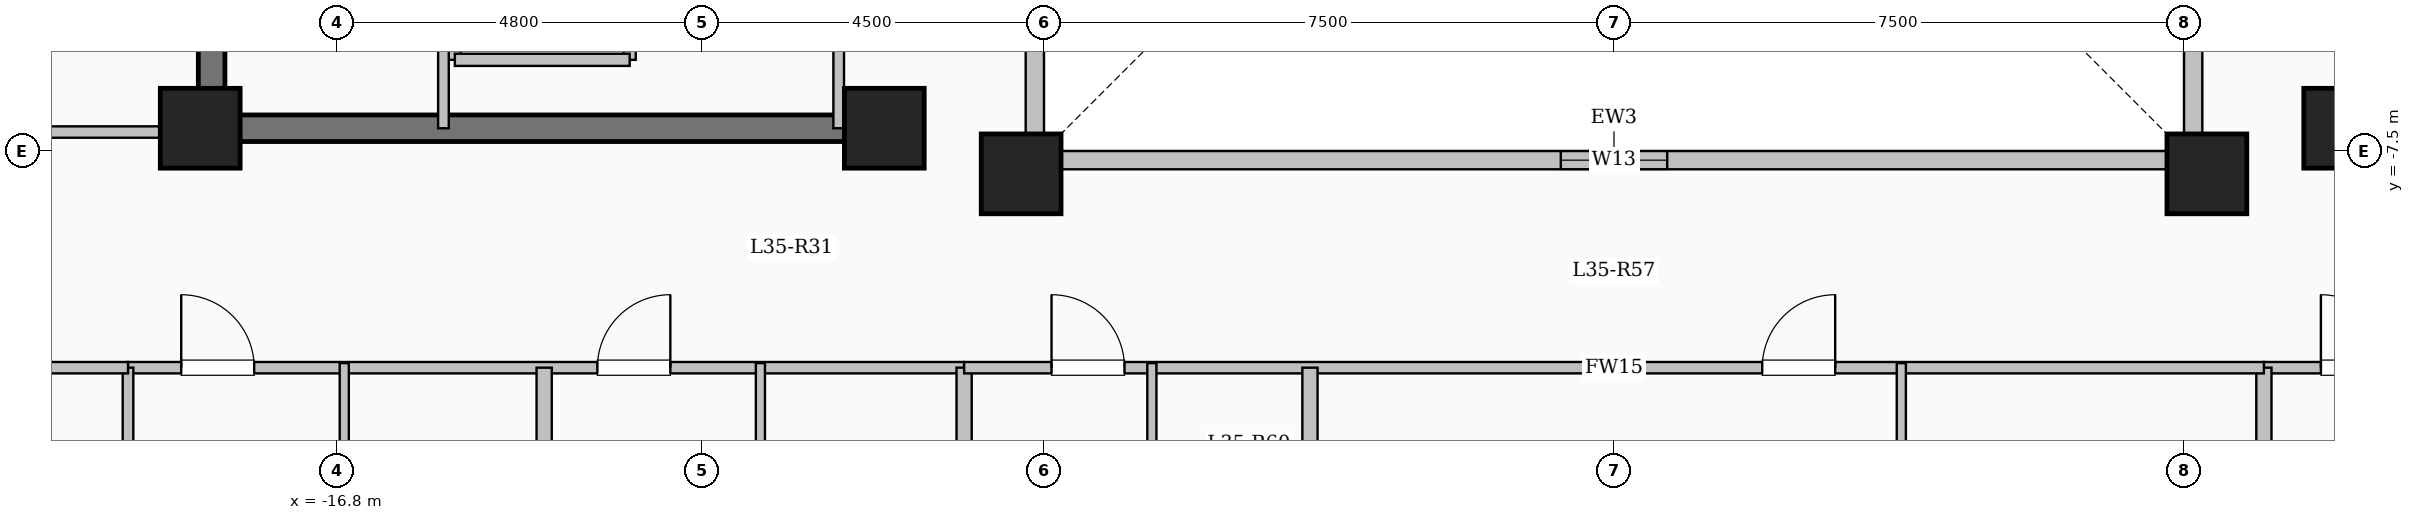
"""IFC4 building model, lengths in metres.
Left out: names, types, materials, properties, quantities, classifications, styles, units other than length and angle.
Written with IfcOpenShell. Run it as: python <this file> out.ifc"""

import sys

from ifc_helpers import new_model, si_unit, direction, frame, frame_2d, origin, origin_2d, place, context, subcontext, project, spatial, rectangle, extrude, element, fill, save


model = new_model("IFC4")
c1 = context("Model", 3, precision=1e-05, world=origin(), true_north=direction((0.0, 1.0)))
c2 = subcontext(c1, "Body", "Model", "MODEL_VIEW")
j1 = project(units=[si_unit("LENGTHUNIT", "METRE"), si_unit("PLANEANGLEUNIT", "RADIAN")], contexts=[c1])
p1 = place(None, origin())
s1 = spatial("IfcSite", under=j1, at=p1, CompositionType="ELEMENT")
p2 = place(p1, origin())
s2 = spatial("IfcBuilding", under=s1, at=p2, CompositionType="ELEMENT")
p3 = place(p2, frame((0.0, 0.0, 132.6)))
s3 = spatial("IfcBuildingStorey", under=s2, at=p3, CompositionType="ELEMENT", Elevation=132.6)
for number, where, z_axis, x_axis in (
    (1, (-7.8, -7.8, 0.0), (0.0, 0.0, 1.0), (1.0, 0.0, 0.0)),
    (2, (7.8, -7.8, 0.0), (0.0, 0.0, 1.0), (1.0, 0.0, 0.0)),
    (3, (-9.6, -7.2, 0.0), (0.0, 0.0, 1.0), (1.0, 0.0, 0.0)),
    (4, (9.6, -7.2, 0.0), (0.0, 0.0, 1.0), (1.0, 0.0, 0.0)),
    (5, (-18.6, -7.2, 0.0), (0.0, 0.0, 1.0), (1.0, 0.0, 0.0)),
):
    element("IfcColumn", number, at=place(p3, frame(where, z_axis=z_axis, x_axis=x_axis)), inside=s3, PredefinedType="COLUMN", context=c2, shape_type="SweptSolid", body=[
        extrude(rectangle(XDim=1.05, YDim=1.05, at=origin_2d()), origin(), (0.0, 0.0, 1.0), 3.35),
    ])
p4 = place(p3, frame((-7.62, -7.62, 0.0), z_axis=(0.0, 0.0, 1.0), x_axis=(1.0, 0.0, 0.0)))
e6 = element("IfcWall", 6, at=p4, inside=s3, PredefinedType="SOLIDWALL", context=c2, shape_type="SweptSolid", body=[
    extrude(rectangle(XDim=15.24, YDim=0.24, at=frame_2d((7.62, 0.0))), origin(), (0.0, 0.0, 1.0), 3.1),
])
p5 = place(p4, frame((6.92, 0.0, 0.95)))
e7 = element("IfcOpeningElement", 7, at=p5, cuts=e6, PredefinedType="OPENING", context=c2, shape_type="SweptSolid", body=[
    extrude(rectangle(XDim=1.4, YDim=1.5, at=frame_2d((0.7, 0.75))), frame((0.0, 0.13, 0.0), z_axis=(0.0, -1.0, 0.0), x_axis=(1.0, 0.0, 0.0)), (0.0, 0.0, 1.0), 0.26),
])
p6 = place(p3, frame((7.62, -7.62, 0.0), z_axis=(0.0, 0.0, 1.0), x_axis=(0.0, 1.0, 0.0)))
e8 = element("IfcWall", 8, at=p6, inside=s3, PredefinedType="SOLIDWALL", context=c2, shape_type="SweptSolid", body=[
    extrude(rectangle(XDim=15.24, YDim=0.24, at=frame_2d((7.62, 0.0))), origin(), (0.0, 0.0, 1.0), 3.1),
])
p7 = place(p6, frame((6.92, 0.0, 0.95)))
e9 = element("IfcOpeningElement", 9, at=p7, cuts=e8, PredefinedType="OPENING", context=c2, shape_type="SweptSolid", body=[
    extrude(rectangle(XDim=1.4, YDim=1.5, at=frame_2d((0.7, 0.75))), frame((0.0, 0.13, 0.0), z_axis=(0.0, -1.0, 0.0), x_axis=(1.0, 0.0, 0.0)), (0.0, 0.0, 1.0), 0.26),
])
p8 = place(p3, frame((-7.62, 7.62, 0.0), z_axis=(0.0, 0.0, 1.0), x_axis=(0.0, -1.0, 0.0)))
e10 = element("IfcWall", 10, at=p8, inside=s3, PredefinedType="SOLIDWALL", context=c2, shape_type="SweptSolid", body=[
    extrude(rectangle(XDim=15.24, YDim=0.24, at=frame_2d((7.62, 0.0))), origin(), (0.0, 0.0, 1.0), 3.1),
])
p9 = place(p8, frame((6.92, 0.0, 0.95)))
e11 = element("IfcOpeningElement", 11, at=p9, cuts=e10, PredefinedType="OPENING", context=c2, shape_type="SweptSolid", body=[
    extrude(rectangle(XDim=1.4, YDim=1.5, at=frame_2d((0.7, 0.75))), frame((0.0, 0.13, 0.0), z_axis=(0.0, -1.0, 0.0), x_axis=(1.0, 0.0, 0.0)), (0.0, 0.0, 1.0), 0.26),
])
for number, where, z_axis, x_axis in (
    (12, (-15.25, -6.3, 0.0), (0.0, 0.0, 1.0), (0.0, 1.0, 0.0)),
    (13, (-12.95, -6.3, 0.0), (0.0, 0.0, 1.0), (0.0, 1.0, 0.0)),
):
    element("IfcWall", number, at=place(p3, frame(where, z_axis=z_axis, x_axis=x_axis)), inside=s3, PredefinedType="SOLIDWALL", context=c2, shape_type="SweptSolid", body=[
        extrude(rectangle(XDim=2.6, YDim=0.16, at=frame_2d((1.3, 0.0))), origin(), (0.0, 0.0, 1.0), 3.1),
    ])
p10 = place(p3, frame((-15.25, -6.3, 0.0), z_axis=(0.0, 0.0, 1.0), x_axis=(1.0, 0.0, 0.0)))
e14 = element("IfcWall", 14, at=p10, inside=s3, PredefinedType="SOLIDWALL", context=c2, shape_type="SweptSolid", body=[
    extrude(rectangle(XDim=2.3, YDim=0.16, at=frame_2d((1.15, 0.0))), origin(), (0.0, 0.0, 1.0), 3.1),
])
p11 = place(p3, frame((-18.45, -7.375, 0.0), z_axis=(0.0, 0.0, 1.0), x_axis=(0.0, 1.0, 0.0)))
e15 = element("IfcWall", 15, at=p11, inside=s3, PredefinedType="SHEAR", context=c2, shape_type="SweptSolid", body=[
    extrude(rectangle(XDim=14.05, YDim=0.35, at=frame_2d((7.025, 0.0))), origin(), (0.0, 0.0, 1.0), 3.35),
])
p12 = place(p3, frame((-18.625, -7.2, 0.0), z_axis=(0.0, 0.0, 1.0), x_axis=(1.0, 0.0, 0.0)))
e16 = element("IfcWall", 16, at=p12, inside=s3, PredefinedType="SHEAR", context=c2, shape_type="SweptSolid", body=[
    extrude(rectangle(XDim=8.55, YDim=0.35, at=frame_2d((4.275, 0.0))), origin(), (0.0, 0.0, 1.0), 3.35),
])
p13 = place(p3, frame((-15.4, -7.2, 0.0), z_axis=(0.0, 0.0, 1.0), x_axis=(0.0, 1.0, 0.0)))
e17 = element("IfcWall", 17, at=p13, inside=s3, PredefinedType="PARTITIONING", context=c2, shape_type="SweptSolid", body=[
    extrude(rectangle(XDim=10.45, YDim=0.14, at=frame_2d((5.225, 0.0))), origin(), (0.0, 0.0, 1.0), 3.1),
])
p14 = place(p13, frame((9.25, 0.0, 0.0)))
e18 = element("IfcOpeningElement", 18, at=p14, cuts=e17, PredefinedType="OPENING", context=c2, shape_type="SweptSolid", body=[
    extrude(rectangle(XDim=0.9, YDim=2.08, at=frame_2d((0.45, 1.04))), frame((0.0, 0.08, 0.0), z_axis=(0.0, -1.0, 0.0), x_axis=(1.0, 0.0, 0.0)), (0.0, 0.0, 1.0), 0.16),
])
p15 = place(p3, frame((-10.2, -7.2, 0.0), z_axis=(0.0, 0.0, 1.0), x_axis=(0.0, 1.0, 0.0)))
e19 = element("IfcWall", 19, at=p15, inside=s3, PredefinedType="PARTITIONING", context=c2, shape_type="SweptSolid", body=[
    extrude(rectangle(XDim=9.12, YDim=0.14, at=frame_2d((4.56, 0.0))), origin(), (0.0, 0.0, 1.0), 3.1),
])
p16 = place(p15, frame((1.9, 0.0, 0.0)))
e20 = element("IfcOpeningElement", 20, at=p16, cuts=e19, PredefinedType="OPENING", context=c2, shape_type="SweptSolid", body=[
    extrude(rectangle(XDim=0.95, YDim=2.12, at=frame_2d((0.475, 1.06))), frame((0.0, 0.08, 0.0), z_axis=(0.0, -1.0, 0.0), x_axis=(1.0, 0.0, 0.0)), (0.0, 0.0, 1.0), 0.16),
])
p17 = place(p15, frame((6.6, 0.0, 0.0)))
e21 = element("IfcOpeningElement", 21, at=p17, cuts=e19, PredefinedType="OPENING", context=c2, shape_type="SweptSolid", body=[
    extrude(rectangle(XDim=0.95, YDim=2.12, at=frame_2d((0.475, 1.06))), frame((0.0, 0.08, 0.0), z_axis=(0.0, -1.0, 0.0), x_axis=(1.0, 0.0, 0.0)), (0.0, 0.0, 1.0), 0.16),
])
p18 = place(p3, frame((-19.55, -10.35, 0.0), z_axis=(0.0, 0.0, 1.0), x_axis=(1.0, 0.0, 0.0)))
e22 = element("IfcWall", 22, at=p18, inside=s3, PredefinedType="PARTITIONING", context=c2, shape_type="SweptSolid", body=[
    extrude(rectangle(XDim=11.0, YDim=0.15, at=frame_2d((5.5, 0.0))), origin(), (0.0, 0.0, 1.0), 3.1),
])
p19 = place(p18, frame((0.7, 0.0, 0.0)))
e23 = element("IfcOpeningElement", 23, at=p19, cuts=e22, PredefinedType="OPENING", context=c2, shape_type="SweptSolid", body=[
    extrude(rectangle(XDim=0.96, YDim=2.15, at=frame_2d((0.48, 1.075))), frame((0.0, 0.085, 0.0), z_axis=(0.0, -1.0, 0.0), x_axis=(1.0, 0.0, 0.0)), (0.0, 0.0, 1.0), 0.17),
])
p20 = place(p18, frame((6.175, 0.0, 0.0)))
e24 = element("IfcOpeningElement", 24, at=p20, cuts=e22, PredefinedType="OPENING", context=c2, shape_type="SweptSolid", body=[
    extrude(rectangle(XDim=0.96, YDim=2.15, at=frame_2d((0.48, 1.075))), frame((0.0, 0.085, 0.0), z_axis=(0.0, -1.0, 0.0), x_axis=(1.0, 0.0, 0.0)), (0.0, 0.0, 1.0), 0.17),
])
p21 = place(p3, frame((8.55, -10.35, 0.0), z_axis=(0.0, 0.0, 1.0), x_axis=(1.0, 0.0, 0.0)))
e25 = element("IfcWall", 25, at=p21, inside=s3, PredefinedType="PARTITIONING", context=c2, shape_type="SweptSolid", body=[
    extrude(rectangle(XDim=11.0, YDim=0.15, at=frame_2d((5.5, 0.0))), origin(), (0.0, 0.0, 1.0), 3.1),
])
p22 = place(p21, frame((0.75, 0.0, 0.0)))
e26 = element("IfcOpeningElement", 26, at=p22, cuts=e25, PredefinedType="OPENING", context=c2, shape_type="SweptSolid", body=[
    extrude(rectangle(XDim=0.96, YDim=2.15, at=frame_2d((0.48, 1.075))), frame((0.0, 0.085, 0.0), z_axis=(0.0, -1.0, 0.0), x_axis=(1.0, 0.0, 0.0)), (0.0, 0.0, 1.0), 0.17),
])
p23 = place(p21, frame((5.787, 0.0, 0.0)))
e27 = element("IfcOpeningElement", 27, at=p23, cuts=e25, PredefinedType="OPENING", context=c2, shape_type="SweptSolid", body=[
    extrude(rectangle(XDim=0.96, YDim=2.15, at=frame_2d((0.48, 1.075))), frame((0.0, 0.085, 0.0), z_axis=(0.0, -1.0, 0.0), x_axis=(1.0, 0.0, 0.0)), (0.0, 0.0, 1.0), 0.17),
])
p24 = place(p3, frame((-14.075, -21.2, 0.0), z_axis=(0.0, 0.0, 1.0), x_axis=(0.0, 1.0, 0.0)))
e28 = element("IfcWall", 28, at=p24, inside=s3, PredefinedType="SOLIDWALL", context=c2, shape_type="SweptSolid", body=[
    extrude(rectangle(XDim=10.85, YDim=0.2, at=frame_2d((5.425, 0.0))), origin(), (0.0, 0.0, 1.0), 3.1),
])
p25 = place(p3, frame((-16.705, -13.51, 0.0), z_axis=(0.0, 0.0, 1.0), x_axis=(0.0, 1.0, 0.0)))
e29 = element("IfcWall", 29, at=p25, inside=s3, PredefinedType="PARTITIONING", context=c2, shape_type="SweptSolid", body=[
    extrude(rectangle(XDim=3.22, YDim=0.12, at=frame_2d((1.61, 0.0))), origin(), (0.0, 0.0, 1.0), 3.1),
])
p26 = place(p25, frame((1.14, 0.0, 0.0)))
e30 = element("IfcOpeningElement", 30, at=p26, cuts=e29, PredefinedType="OPENING", context=c2, shape_type="SweptSolid", body=[
    extrude(rectangle(XDim=0.88, YDim=2.1, at=frame_2d((0.44, 1.05))), frame((0.0, 0.07, 0.0), z_axis=(0.0, -1.0, 0.0), x_axis=(1.0, 0.0, 0.0)), (0.0, 0.0, 1.0), 0.14),
])
p27 = place(p3, frame((-11.23, -13.51, 0.0), z_axis=(0.0, 0.0, 1.0), x_axis=(0.0, 1.0, 0.0)))
e31 = element("IfcWall", 31, at=p27, inside=s3, PredefinedType="PARTITIONING", context=c2, shape_type="SweptSolid", body=[
    extrude(rectangle(XDim=3.22, YDim=0.12, at=frame_2d((1.61, 0.0))), origin(), (0.0, 0.0, 1.0), 3.1),
])
p28 = place(p27, frame((1.14, 0.0, 0.0)))
e32 = element("IfcOpeningElement", 32, at=p28, cuts=e31, PredefinedType="OPENING", context=c2, shape_type="SweptSolid", body=[
    extrude(rectangle(XDim=0.88, YDim=2.1, at=frame_2d((0.44, 1.05))), frame((0.0, 0.07, 0.0), z_axis=(0.0, -1.0, 0.0), x_axis=(1.0, 0.0, 0.0)), (0.0, 0.0, 1.0), 0.14),
])
for number, where, z_axis, x_axis in (
    (33, (-8.55, -21.804, 0.0), (0.0, 0.0, 1.0), (0.0, 1.0, 0.0)),
    (34, (8.55, -21.804, 0.0), (0.0, 0.0, 1.0), (0.0, 1.0, 0.0)),
):
    element("IfcWall", number, at=place(p3, frame(where, z_axis=z_axis, x_axis=x_axis)), inside=s3, PredefinedType="SOLIDWALL", context=c2, shape_type="SweptSolid", body=[
        extrude(rectangle(XDim=11.454, YDim=0.2, at=frame_2d((5.727, 0.0))), origin(), (0.0, 0.0, 1.0), 3.1),
    ])
p29 = place(p3, frame((-8.55, -10.35, 0.0), z_axis=(0.0, 0.0, 1.0), x_axis=(1.0, 0.0, 0.0)))
e35 = element("IfcWall", 35, at=p29, inside=s3, PredefinedType="PARTITIONING", context=c2, shape_type="SweptSolid", body=[
    extrude(rectangle(XDim=17.1, YDim=0.15, at=frame_2d((8.55, 0.0))), origin(), (0.0, 0.0, 1.0), 3.1),
])
p30 = place(p29, frame((1.15, 0.0, 0.0)))
e36 = element("IfcOpeningElement", 36, at=p30, cuts=e35, PredefinedType="OPENING", context=c2, shape_type="SweptSolid", body=[
    extrude(rectangle(XDim=0.96, YDim=2.15, at=frame_2d((0.48, 1.075))), frame((0.0, 0.085, 0.0), z_axis=(0.0, -1.0, 0.0), x_axis=(1.0, 0.0, 0.0)), (0.0, 0.0, 1.0), 0.17),
])
p31 = place(p29, frame((10.5, 0.0, 0.0)))
e37 = element("IfcOpeningElement", 37, at=p31, cuts=e35, PredefinedType="OPENING", context=c2, shape_type="SweptSolid", body=[
    extrude(rectangle(XDim=0.96, YDim=2.15, at=frame_2d((0.48, 1.075))), frame((0.0, 0.085, 0.0), z_axis=(0.0, -1.0, 0.0), x_axis=(1.0, 0.0, 0.0)), (0.0, 0.0, 1.0), 0.17),
])
p32 = place(p3, frame((-4.0, -21.15, 0.0), z_axis=(0.0, 0.0, 1.0), x_axis=(0.0, 1.0, 0.0)))
e38 = element("IfcWall", 38, at=p32, inside=s3, PredefinedType="SOLIDWALL", context=c2, shape_type="SweptSolid", body=[
    extrude(rectangle(XDim=10.8, YDim=0.2, at=frame_2d((5.4, 0.0))), origin(), (0.0, 0.0, 1.0), 3.1),
])
p33 = place(p3, frame((-6.08, -13.51, 0.0), z_axis=(0.0, 0.0, 1.0), x_axis=(0.0, 1.0, 0.0)))
e39 = element("IfcWall", 39, at=p33, inside=s3, PredefinedType="PARTITIONING", context=c2, shape_type="SweptSolid", body=[
    extrude(rectangle(XDim=3.22, YDim=0.12, at=frame_2d((1.61, 0.0))), origin(), (0.0, 0.0, 1.0), 3.1),
])
p34 = place(p33, frame((1.14, 0.0, 0.0)))
e40 = element("IfcOpeningElement", 40, at=p34, cuts=e39, PredefinedType="OPENING", context=c2, shape_type="SweptSolid", body=[
    extrude(rectangle(XDim=0.88, YDim=2.1, at=frame_2d((0.44, 1.05))), frame((0.0, 0.07, 0.0), z_axis=(0.0, -1.0, 0.0), x_axis=(1.0, 0.0, 0.0)), (0.0, 0.0, 1.0), 0.14),
])
p35 = place(p3, frame((3.78, -13.51, 0.0), z_axis=(0.0, 0.0, 1.0), x_axis=(0.0, 1.0, 0.0)))
e41 = element("IfcWall", 41, at=p35, inside=s3, PredefinedType="PARTITIONING", context=c2, shape_type="SweptSolid", body=[
    extrude(rectangle(XDim=3.22, YDim=0.12, at=frame_2d((1.61, 0.0))), origin(), (0.0, 0.0, 1.0), 3.1),
])
p36 = place(p35, frame((1.14, 0.0, 0.0)))
e42 = element("IfcOpeningElement", 42, at=p36, cuts=e41, PredefinedType="OPENING", context=c2, shape_type="SweptSolid", body=[
    extrude(rectangle(XDim=0.88, YDim=2.1, at=frame_2d((0.44, 1.05))), frame((0.0, 0.07, 0.0), z_axis=(0.0, -1.0, 0.0), x_axis=(1.0, 0.0, 0.0)), (0.0, 0.0, 1.0), 0.14),
])
p37 = place(p3, frame((-25.08, -7.25, 0.0), z_axis=(0.0, 0.0, 1.0), x_axis=(1.0, 0.0, 0.0)))
e43 = element("IfcWall", 43, at=p37, inside=s3, PredefinedType="PARTITIONING", context=c2, shape_type="SweptSolid", body=[
    extrude(rectangle(XDim=6.63, YDim=0.15, at=frame_2d((3.315, 0.0))), origin(), (0.0, 0.0, 1.0), 3.1),
])
p38 = place(p37, frame((3.53, 0.0, 0.0)))
e44 = element("IfcOpeningElement", 44, at=p38, cuts=e43, PredefinedType="OPENING", context=c2, shape_type="SweptSolid", body=[
    extrude(rectangle(XDim=0.96, YDim=2.15, at=frame_2d((0.48, 1.075))), frame((0.0, 0.085, 0.0), z_axis=(0.0, -1.0, 0.0), x_axis=(1.0, 0.0, 0.0)), (0.0, 0.0, 1.0), 0.17),
])
p39 = place(p3, frame((-19.55, -17.25, 0.0), z_axis=(0.0, 0.0, 1.0), x_axis=(0.0, 1.0, 0.0)))
e45 = element("IfcWall", 45, at=p39, inside=s3, PredefinedType="PARTITIONING", context=c2, shape_type="SweptSolid", body=[
    extrude(rectangle(XDim=6.9, YDim=0.14, at=frame_2d((3.45, 0.0))), origin(), (0.0, 0.0, 1.0), 3.1),
])
p40 = place(p3, frame((-25.08, -10.35, 0.0), z_axis=(0.0, 0.0, 1.0), x_axis=(1.0, 0.0, 0.0)))
e46 = element("IfcWall", 46, at=p40, inside=s3, PredefinedType="PARTITIONING", context=c2, shape_type="SweptSolid", body=[
    extrude(rectangle(XDim=5.53, YDim=0.15, at=frame_2d((2.765, 0.0))), origin(), (0.0, 0.0, 1.0), 3.1),
])
p41 = place(p40, frame((2.29, 0.0, 0.0)))
e47 = element("IfcOpeningElement", 47, at=p41, cuts=e46, PredefinedType="OPENING", context=c2, shape_type="SweptSolid", body=[
    extrude(rectangle(XDim=0.95, YDim=2.15, at=frame_2d((0.475, 1.075))), frame((0.0, 0.085, 0.0), z_axis=(0.0, -1.0, 0.0), x_axis=(1.0, 0.0, 0.0)), (0.0, 0.0, 1.0), 0.17),
])
p42 = place(p5, origin())
e48 = element("IfcWindow", 48, at=p42, inside=s3, PartitioningType="SINGLE_PANEL", PredefinedType="WINDOW", context=c2, shape_type="SweptSolid", body=[
    extrude(rectangle(XDim=1.4, YDim=1.5, at=frame_2d((0.7, 0.75))), frame((0.0, 0.03, 0.0), z_axis=(0.0, -1.0, 0.0), x_axis=(1.0, 0.0, 0.0)), (0.0, 0.0, 1.0), 0.06),
])
fill(e7, e48)
p43 = place(p19, origin())
e49 = element("IfcDoor", 49, at=p43, inside=s3, OperationType="SINGLE_SWING_LEFT", PredefinedType="DOOR", context=c2, shape_type="SweptSolid", body=[
    extrude(rectangle(XDim=0.96, YDim=2.15, at=frame_2d((0.48, 1.075))), frame((0.0, 0.025, 0.0), z_axis=(0.0, -1.0, 0.0), x_axis=(1.0, 0.0, 0.0)), (0.0, 0.0, 1.0), 0.05),
])
fill(e23, e49)
p44 = place(p20, origin())
e50 = element("IfcDoor", 50, at=p44, inside=s3, OperationType="SINGLE_SWING_RIGHT", PredefinedType="DOOR", context=c2, shape_type="SweptSolid", body=[
    extrude(rectangle(XDim=0.96, YDim=2.15, at=frame_2d((0.48, 1.075))), frame((0.0, 0.025, 0.0), z_axis=(0.0, -1.0, 0.0), x_axis=(1.0, 0.0, 0.0)), (0.0, 0.0, 1.0), 0.05),
])
fill(e24, e50)
p45 = place(p22, origin())
e51 = element("IfcDoor", 51, at=p45, inside=s3, OperationType="SINGLE_SWING_LEFT", PredefinedType="DOOR", context=c2, shape_type="SweptSolid", body=[
    extrude(rectangle(XDim=0.96, YDim=2.15, at=frame_2d((0.48, 1.075))), frame((0.0, 0.025, 0.0), z_axis=(0.0, -1.0, 0.0), x_axis=(1.0, 0.0, 0.0)), (0.0, 0.0, 1.0), 0.05),
])
fill(e26, e51)
p46 = place(p30, origin())
e52 = element("IfcDoor", 52, at=p46, inside=s3, OperationType="SINGLE_SWING_LEFT", PredefinedType="DOOR", context=c2, shape_type="SweptSolid", body=[
    extrude(rectangle(XDim=0.96, YDim=2.15, at=frame_2d((0.48, 1.075))), frame((0.0, 0.025, 0.0), z_axis=(0.0, -1.0, 0.0), x_axis=(1.0, 0.0, 0.0)), (0.0, 0.0, 1.0), 0.05),
])
fill(e36, e52)
p47 = place(p31, origin())
e53 = element("IfcDoor", 53, at=p47, inside=s3, OperationType="SINGLE_SWING_RIGHT", PredefinedType="DOOR", context=c2, shape_type="SweptSolid", body=[
    extrude(rectangle(XDim=0.96, YDim=2.15, at=frame_2d((0.48, 1.075))), frame((0.0, 0.025, 0.0), z_axis=(0.0, -1.0, 0.0), x_axis=(1.0, 0.0, 0.0)), (0.0, 0.0, 1.0), 0.05),
])
fill(e37, e53)
save(model, sys.argv[1])
